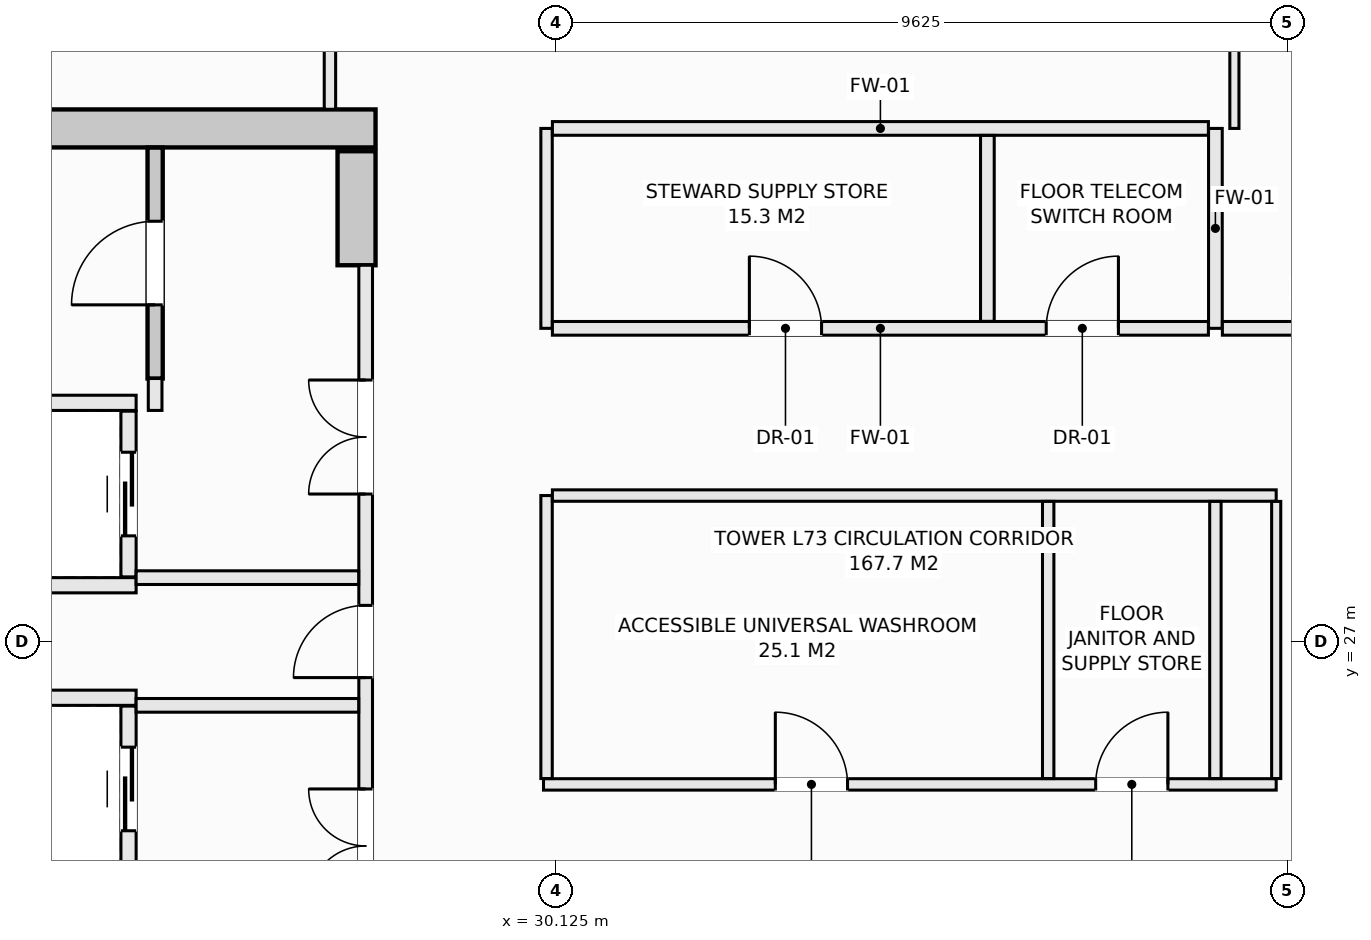
"""IFC4 building model, lengths in metres.
Left out: names, types, materials, properties, quantities, classifications, styles, units other than length and angle.
Written with IfcOpenShell. Run it as: python <this file> out.ifc"""

import sys

from ifc_helpers import new_model, si_unit, direction, frame, frame_2d, origin, place, context, subcontext, project, spatial, rectangle, extrude, element, fill, save


model = new_model("IFC4")
c1 = context("Model", 3, precision=1e-05, world=origin(), true_north=direction((0.0, 1.0)))
c2 = subcontext(c1, "Body", "Model", "MODEL_VIEW")
j1 = project(units=[si_unit("LENGTHUNIT", "METRE"), si_unit("PLANEANGLEUNIT", "RADIAN")], contexts=[c1])
p1 = place(None, origin())
s1 = spatial("IfcSite", under=j1, at=p1, CompositionType="ELEMENT")
p2 = place(p1, origin())
s2 = spatial("IfcBuilding", under=s1, at=p2, CompositionType="ELEMENT")
p3 = place(p2, frame((0.0, 0.0, 269.0)))
s3 = spatial("IfcBuildingStorey", under=s2, at=p3, CompositionType="ELEMENT", Elevation=269.0)
p4 = place(p3, frame((14.25, 33.75, -0.27), z_axis=(0.0, 0.0, 1.0), x_axis=(1.0, 0.0, 0.0)))
e1 = element("IfcWall", 1, at=p4, inside=s3, PredefinedType="SHEAR", context=c2, shape_type="SweptSolid", body=[
    extrude(rectangle(XDim=13.5, YDim=0.5, at=frame_2d((6.75, 0.0))), origin(), (0.0, 0.0, 1.0), 3.3),
])
p5 = place(p3, frame((27.5, 31.95, -0.27), z_axis=(0.0, 0.0, 1.0), x_axis=(0.0, 1.0, 0.0)))
e2 = element("IfcWall", 2, at=p5, inside=s3, PredefinedType="SHEAR", context=c2, shape_type="SweptSolid", body=[
    extrude(rectangle(XDim=1.5, YDim=0.5, at=frame_2d((0.75, 0.0))), origin(), (0.0, 0.0, 1.0), 3.3),
])
p6 = place(p3, frame((24.85, 30.46, -0.27), z_axis=(0.0, 0.0, 1.0), x_axis=(0.0, 1.0, 0.0)))
e3 = element("IfcWall", 3, at=p6, inside=s3, PredefinedType="SHEAR", context=c2, shape_type="SweptSolid", body=[
    extrude(rectangle(XDim=3.038, YDim=0.2, at=frame_2d((1.519, 0.0))), origin(), (0.0, 0.0, 1.0), 3.3),
])
p7 = place(p6, frame((0.969, 0.0, 0.27)))
e4 = element("IfcOpeningElement", 4, at=p7, cuts=e3, PredefinedType="OPENING", context=c2, shape_type="SweptSolid", body=[
    extrude(rectangle(XDim=1.1, YDim=2.15, at=frame_2d((0.55, 1.075))), frame((0.0, 0.11, 0.0), z_axis=(0.0, -1.0, 0.0), x_axis=(1.0, 0.0, 0.0)), (0.0, 0.0, 1.0), 0.22),
])
for number, where, z_axis, x_axis in (
    (5, (22.15, 30.14, 0.0), (0.0, 0.0, 1.0), (1.0, 0.0, 0.0)),
    (6, (22.15, 27.74, 0.0), (0.0, 0.0, 1.0), (1.0, 0.0, 0.0)),
):
    element("IfcWall", number, at=place(p3, frame(where, z_axis=z_axis, x_axis=x_axis)), inside=s3, PredefinedType="SOLIDWALL", context=c2, shape_type="SweptSolid", body=[
        extrude(rectangle(XDim=2.45, YDim=0.2, at=frame_2d((1.225, 0.0))), origin(), (0.0, 0.0, 1.0), 3.03),
    ])
p8 = place(p3, frame((24.5, 27.85, 0.0), z_axis=(0.0, 0.0, 1.0), x_axis=(0.0, 1.0, 0.0)))
e7 = element("IfcWall", 7, at=p8, inside=s3, PredefinedType="SOLIDWALL", context=c2, shape_type="SweptSolid", body=[
    extrude(rectangle(XDim=2.18, YDim=0.2, at=frame_2d((1.09, 0.0))), origin(), (0.0, 0.0, 1.0), 3.03),
])
p9 = place(p8, frame((0.54, 0.0, 0.0)))
e8 = element("IfcOpeningElement", 8, at=p9, cuts=e7, PredefinedType="OPENING", context=c2, shape_type="SweptSolid", body=[
    extrude(rectangle(XDim=1.1, YDim=2.2, at=frame_2d((0.55, 1.1))), frame((0.0, 0.11, 0.0), z_axis=(0.0, -1.0, 0.0), x_axis=(1.0, 0.0, 0.0)), (0.0, 0.0, 1.0), 0.22),
])
p10 = place(p3, frame((22.15, 26.26, 0.0), z_axis=(0.0, 0.0, 1.0), x_axis=(1.0, 0.0, 0.0)))
e9 = element("IfcWall", 9, at=p10, inside=s3, PredefinedType="SOLIDWALL", context=c2, shape_type="SweptSolid", body=[
    extrude(rectangle(XDim=2.45, YDim=0.2, at=frame_2d((1.225, 0.0))), origin(), (0.0, 0.0, 1.0), 3.03),
])
p11 = place(p3, frame((24.5, 23.97, 0.0), z_axis=(0.0, 0.0, 1.0), x_axis=(0.0, 1.0, 0.0)))
e10 = element("IfcWall", 10, at=p11, inside=s3, PredefinedType="SOLIDWALL", context=c2, shape_type="SweptSolid", body=[
    extrude(rectangle(XDim=2.18, YDim=0.2, at=frame_2d((1.09, 0.0))), origin(), (0.0, 0.0, 1.0), 3.03),
])
p12 = place(p11, frame((0.54, 0.0, 0.0)))
e11 = element("IfcOpeningElement", 11, at=p12, cuts=e10, PredefinedType="OPENING", context=c2, shape_type="SweptSolid", body=[
    extrude(rectangle(XDim=1.1, YDim=2.2, at=frame_2d((0.55, 1.1))), frame((0.0, 0.11, 0.0), z_axis=(0.0, -1.0, 0.0), x_axis=(1.0, 0.0, 0.0)), (0.0, 0.0, 1.0), 0.22),
])
p13 = place(p3, frame((24.85, 30.04, 0.0), z_axis=(0.0, 0.0, 1.0), x_axis=(0.0, 1.0, 0.0)))
e12 = element("IfcWall", 12, at=p13, inside=s3, PredefinedType="SOLIDWALL", context=c2, shape_type="SweptSolid", body=[
    extrude(rectangle(XDim=0.42, YDim=0.18, at=frame_2d((0.21, 0.0))), origin(), (0.0, 0.0, 1.0), 3.03),
])
p14 = place(p3, frame((27.62, 22.05, 0.0), z_axis=(0.0, 0.0, 1.0), x_axis=(0.0, 1.0, 0.0)))
e13 = element("IfcWall", 13, at=p14, inside=s3, PredefinedType="SOLIDWALL", context=c2, shape_type="SweptSolid", body=[
    extrude(rectangle(XDim=9.9, YDim=0.18, at=frame_2d((4.95, 0.0))), origin(), (0.0, 0.0, 1.0), 3.03),
])
p15 = place(p14, frame((4.475, 0.0, 0.0)))
e14 = element("IfcOpeningElement", 14, at=p15, cuts=e13, PredefinedType="OPENING", context=c2, shape_type="SweptSolid", body=[
    extrude(rectangle(XDim=0.95, YDim=2.1, at=frame_2d((0.475, 1.05))), frame((0.0, 0.1, 0.0), z_axis=(0.0, -1.0, 0.0), x_axis=(1.0, 0.0, 0.0)), (0.0, 0.0, 1.0), 0.2),
])
p16 = place(p14, frame((6.89, 0.0, 0.0)))
e15 = element("IfcOpeningElement", 15, at=p16, cuts=e13, PredefinedType="OPENING", context=c2, shape_type="SweptSolid", body=[
    extrude(rectangle(XDim=1.5, YDim=2.2, at=frame_2d((0.75, 1.1))), frame((0.0, 0.1, 0.0), z_axis=(0.0, -1.0, 0.0), x_axis=(1.0, 0.0, 0.0)), (0.0, 0.0, 1.0), 0.2),
])
p17 = place(p14, frame((1.51, 0.0, 0.0)))
e16 = element("IfcOpeningElement", 16, at=p17, cuts=e13, PredefinedType="OPENING", context=c2, shape_type="SweptSolid", body=[
    extrude(rectangle(XDim=1.5, YDim=2.2, at=frame_2d((0.75, 1.1))), frame((0.0, 0.1, 0.0), z_axis=(0.0, -1.0, 0.0), x_axis=(1.0, 0.0, 0.0)), (0.0, 0.0, 1.0), 0.2),
])
for number, where, z_axis, x_axis in (
    (17, (24.6, 27.84, 0.0), (0.0, 0.0, 1.0), (1.0, 0.0, 0.0)),
    (18, (24.6, 26.16, 0.0), (0.0, 0.0, 1.0), (1.0, 0.0, 0.0)),
):
    element("IfcWall", number, at=place(p3, frame(where, z_axis=z_axis, x_axis=x_axis)), inside=s3, PredefinedType="SOLIDWALL", context=c2, shape_type="SweptSolid", body=[
        extrude(rectangle(XDim=2.928, YDim=0.18, at=frame_2d((1.464, 0.0))), origin(), (0.0, 0.0, 1.0), 3.03),
    ])
p18 = place(p3, frame((27.15, 34.002, 0.0), z_axis=(0.0, 0.0, 1.0), x_axis=(0.0, 1.0, 0.0)))
e19 = element("IfcWall", 19, at=p18, inside=s3, PredefinedType="PARTITIONING", context=c2, shape_type="SweptSolid", body=[
    extrude(rectangle(XDim=4.198, YDim=0.15, at=frame_2d((2.099, 0.0))), origin(), (0.0, 0.0, 1.0), 3.03),
])
p19 = place(p18, frame((1.998, 0.0, 0.0)))
e20 = element("IfcOpeningElement", 20, at=p19, cuts=e19, PredefinedType="OPENING", context=c2, shape_type="SweptSolid", body=[
    extrude(rectangle(XDim=0.95, YDim=2.1, at=frame_2d((0.475, 1.05))), frame((0.0, 0.085, 0.0), z_axis=(0.0, -1.0, 0.0), x_axis=(1.0, 0.0, 0.0)), (0.0, 0.0, 1.0), 0.17),
])
p20 = place(p3, frame((29.96, 25.12, 0.0), z_axis=(0.0, 0.0, 1.0), x_axis=(1.0, 0.0, 0.0)))
e21 = element("IfcWall", 21, at=p20, inside=s3, PredefinedType="PARTITIONING", context=c2, shape_type="SweptSolid", body=[
    extrude(rectangle(XDim=9.64, YDim=0.15, at=frame_2d((4.82, 0.0))), origin(), (0.0, 0.0, 1.0), 3.03),
])
p21 = place(p20, frame((3.05, 0.0, 0.0)))
e22 = element("IfcOpeningElement", 22, at=p21, cuts=e21, PredefinedType="OPENING", context=c2, shape_type="SweptSolid", body=[
    extrude(rectangle(XDim=0.95, YDim=2.1, at=frame_2d((0.475, 1.05))), frame((0.0, 0.085, 0.0), z_axis=(0.0, -1.0, 0.0), x_axis=(1.0, 0.0, 0.0)), (0.0, 0.0, 1.0), 0.17),
])
p22 = place(p20, frame((7.265, 0.0, 0.0)))
e23 = element("IfcOpeningElement", 23, at=p22, cuts=e21, PredefinedType="OPENING", context=c2, shape_type="SweptSolid", body=[
    extrude(rectangle(XDim=0.95, YDim=2.1, at=frame_2d((0.475, 1.05))), frame((0.0, 0.085, 0.0), z_axis=(0.0, -1.0, 0.0), x_axis=(1.0, 0.0, 0.0)), (0.0, 0.0, 1.0), 0.17),
])
p23 = place(p3, frame((30.0, 25.197, 0.0), z_axis=(0.0, 0.0, 1.0), x_axis=(0.0, 1.0, 0.0)))
e24 = element("IfcWall", 24, at=p23, inside=s3, PredefinedType="PARTITIONING", context=c2, shape_type="SweptSolid", body=[
    extrude(rectangle(XDim=3.723, YDim=0.15, at=frame_2d((1.861, 0.0))), origin(), (0.0, 0.0, 1.0), 3.03),
])
p24 = place(p3, frame((30.0, 31.12, 0.0), z_axis=(0.0, 0.0, 1.0), x_axis=(0.0, 1.0, 0.0)))
e25 = element("IfcWall", 25, at=p24, inside=s3, PredefinedType="PARTITIONING", context=c2, shape_type="SweptSolid", body=[
    extrude(rectangle(XDim=2.63, YDim=0.15, at=frame_2d((1.315, 0.0))), origin(), (0.0, 0.0, 1.0), 3.03),
])
p25 = place(p3, frame((30.077, 28.92, 0.0), z_axis=(0.0, 0.0, 1.0), x_axis=(1.0, 0.0, 0.0)))
e26 = element("IfcWall", 26, at=p25, inside=s3, PredefinedType="PARTITIONING", context=c2, shape_type="SweptSolid", body=[
    extrude(rectangle(XDim=9.523, YDim=0.15, at=frame_2d((4.762, 0.0))), origin(), (0.0, 0.0, 1.0), 3.03),
])
for number, where, z_axis, x_axis in (
    (27, (36.6, 25.197, 0.0), (0.0, 0.0, 1.0), (0.0, 1.0, 0.0)),
    (28, (38.8, 25.197, 0.0), (0.0, 0.0, 1.0), (0.0, 1.0, 0.0)),
):
    element("IfcWall", number, at=place(p3, frame(where, z_axis=z_axis, x_axis=x_axis)), inside=s3, PredefinedType="PARTITIONING", context=c2, shape_type="SweptSolid", body=[
        extrude(rectangle(XDim=3.646, YDim=0.15, at=frame_2d((1.823, 0.0))), origin(), (0.0, 0.0, 1.0), 3.03),
    ])
p26 = place(p3, frame((38.8, 31.12, 0.0), z_axis=(0.0, 0.0, 1.0), x_axis=(0.0, 1.0, 0.0)))
e29 = element("IfcWall", 29, at=p26, inside=s3, PredefinedType="SOLIDWALL", context=c2, shape_type="SweptSolid", body=[
    extrude(rectangle(XDim=2.63, YDim=0.18, at=frame_2d((1.315, 0.0))), origin(), (0.0, 0.0, 1.0), 3.03),
])
p27 = place(p3, frame((30.077, 31.12, 0.0), z_axis=(0.0, 0.0, 1.0), x_axis=(1.0, 0.0, 0.0)))
e30 = element("IfcWall", 30, at=p27, inside=s3, PredefinedType="SOLIDWALL", context=c2, shape_type="SweptSolid", body=[
    extrude(rectangle(XDim=8.631, YDim=0.18, at=frame_2d((4.315, 0.0))), origin(), (0.0, 0.0, 1.0), 3.03),
])
p28 = place(p27, frame((2.592, 0.0, 0.0)))
e31 = element("IfcOpeningElement", 31, at=p28, cuts=e30, PredefinedType="OPENING", context=c2, shape_type="SweptSolid", body=[
    extrude(rectangle(XDim=0.95, YDim=2.1, at=frame_2d((0.475, 1.05))), frame((0.0, 0.1, 0.0), z_axis=(0.0, -1.0, 0.0), x_axis=(1.0, 0.0, 0.0)), (0.0, 0.0, 1.0), 0.2),
])
p29 = place(p27, frame((6.497, 0.0, 0.0)))
e32 = element("IfcOpeningElement", 32, at=p29, cuts=e30, PredefinedType="OPENING", context=c2, shape_type="SweptSolid", body=[
    extrude(rectangle(XDim=0.95, YDim=2.1, at=frame_2d((0.475, 1.05))), frame((0.0, 0.1, 0.0), z_axis=(0.0, -1.0, 0.0), x_axis=(1.0, 0.0, 0.0)), (0.0, 0.0, 1.0), 0.2),
])
p30 = place(p3, frame((38.892, 31.12, 0.0), z_axis=(0.0, 0.0, 1.0), x_axis=(1.0, 0.0, 0.0)))
e33 = element("IfcWall", 33, at=p30, inside=s3, PredefinedType="SOLIDWALL", context=c2, shape_type="SweptSolid", body=[
    extrude(rectangle(XDim=2.628, YDim=0.18, at=frame_2d((1.314, 0.0))), origin(), (0.0, 0.0, 1.0), 3.03),
])
p31 = place(p3, frame((30.077, 33.75, 0.0), z_axis=(0.0, 0.0, 1.0), x_axis=(1.0, 0.0, 0.0)))
e34 = element("IfcWall", 34, at=p31, inside=s3, PredefinedType="SOLIDWALL", context=c2, shape_type="SweptSolid", body=[
    extrude(rectangle(XDim=8.631, YDim=0.18, at=frame_2d((4.315, 0.0))), origin(), (0.0, 0.0, 1.0), 3.03),
])
p32 = place(p3, frame((35.8, 31.212, 0.0), z_axis=(0.0, 0.0, 1.0), x_axis=(0.0, 1.0, 0.0)))
e35 = element("IfcWall", 35, at=p32, inside=s3, PredefinedType="SOLIDWALL", context=c2, shape_type="SweptSolid", body=[
    extrude(rectangle(XDim=2.446, YDim=0.18, at=frame_2d((1.223, 0.0))), origin(), (0.0, 0.0, 1.0), 3.03),
])
p33 = place(p3, frame((39.05, 33.75, 0.0), z_axis=(0.0, 0.0, 1.0), x_axis=(0.0, 1.0, 0.0)))
e36 = element("IfcWall", 36, at=p33, inside=s3, PredefinedType="PARTITIONING", context=c2, shape_type="SweptSolid", body=[
    extrude(rectangle(XDim=1.938, YDim=0.12, at=frame_2d((0.969, 0.0))), origin(), (0.0, 0.0, 1.0), 3.03),
])
p34 = place(p3, frame((39.6, 25.197, 0.0), z_axis=(0.0, 0.0, 1.0), x_axis=(0.0, 1.0, 0.0)))
e37 = element("IfcWall", 37, at=p34, inside=s3, PredefinedType="PARTITIONING", context=c2, shape_type="SweptSolid", body=[
    extrude(rectangle(XDim=3.646, YDim=0.12, at=frame_2d((1.823, 0.0))), origin(), (0.0, 0.0, 1.0), 3.03),
])
p35 = place(p7, origin())
e38 = element("IfcDoor", 38, at=p35, inside=s3, OperationType="SINGLE_SWING_LEFT", PredefinedType="DOOR", context=c2, shape_type="SweptSolid", body=[
    extrude(rectangle(XDim=1.1, YDim=2.15, at=frame_2d((0.55, 1.075))), frame((0.0, 0.025, 0.0), z_axis=(0.0, -1.0, 0.0), x_axis=(1.0, 0.0, 0.0)), (0.0, 0.0, 1.0), 0.05),
])
fill(e4, e38)
p36 = place(p9, origin())
e39 = element("IfcDoor", 39, at=p36, inside=s3, OperationType="SLIDING_TO_LEFT", PredefinedType="DOOR", context=c2, shape_type="SweptSolid", body=[
    extrude(rectangle(XDim=1.1, YDim=2.2, at=frame_2d((0.55, 1.1))), frame((0.0, 0.025, 0.0), z_axis=(0.0, -1.0, 0.0), x_axis=(1.0, 0.0, 0.0)), (0.0, 0.0, 1.0), 0.05),
])
fill(e8, e39)
p37 = place(p12, origin())
e40 = element("IfcDoor", 40, at=p37, inside=s3, OperationType="SLIDING_TO_LEFT", PredefinedType="DOOR", context=c2, shape_type="SweptSolid", body=[
    extrude(rectangle(XDim=1.1, YDim=2.2, at=frame_2d((0.55, 1.1))), frame((0.0, 0.025, 0.0), z_axis=(0.0, -1.0, 0.0), x_axis=(1.0, 0.0, 0.0)), (0.0, 0.0, 1.0), 0.05),
])
fill(e11, e40)
p38 = place(p15, origin())
e41 = element("IfcDoor", 41, at=p38, inside=s3, OperationType="SINGLE_SWING_LEFT", PredefinedType="DOOR", context=c2, shape_type="SweptSolid", body=[
    extrude(rectangle(XDim=0.95, YDim=2.1, at=frame_2d((0.475, 1.05))), frame((0.0, 0.025, 0.0), z_axis=(0.0, -1.0, 0.0), x_axis=(1.0, 0.0, 0.0)), (0.0, 0.0, 1.0), 0.05),
])
fill(e14, e41)
p39 = place(p16, origin())
e42 = element("IfcDoor", 42, at=p39, inside=s3, OperationType="DOUBLE_DOOR_SINGLE_SWING", PredefinedType="DOOR", context=c2, shape_type="SweptSolid", body=[
    extrude(rectangle(XDim=1.5, YDim=2.2, at=frame_2d((0.75, 1.1))), frame((0.0, 0.025, 0.0), z_axis=(0.0, -1.0, 0.0), x_axis=(1.0, 0.0, 0.0)), (0.0, 0.0, 1.0), 0.05),
])
fill(e15, e42)
p40 = place(p17, origin())
e43 = element("IfcDoor", 43, at=p40, inside=s3, OperationType="DOUBLE_DOOR_SINGLE_SWING", PredefinedType="DOOR", context=c2, shape_type="SweptSolid", body=[
    extrude(rectangle(XDim=1.5, YDim=2.2, at=frame_2d((0.75, 1.1))), frame((0.0, 0.025, 0.0), z_axis=(0.0, -1.0, 0.0), x_axis=(1.0, 0.0, 0.0)), (0.0, 0.0, 1.0), 0.05),
])
fill(e16, e43)
p41 = place(p21, origin())
e44 = element("IfcDoor", 44, at=p41, inside=s3, OperationType="SINGLE_SWING_LEFT", PredefinedType="DOOR", context=c2, shape_type="SweptSolid", body=[
    extrude(rectangle(XDim=0.95, YDim=2.1, at=frame_2d((0.475, 1.05))), frame((0.0, 0.025, 0.0), z_axis=(0.0, -1.0, 0.0), x_axis=(1.0, 0.0, 0.0)), (0.0, 0.0, 1.0), 0.05),
])
fill(e22, e44)
p42 = place(p22, origin())
e45 = element("IfcDoor", 45, at=p42, inside=s3, OperationType="SINGLE_SWING_RIGHT", PredefinedType="DOOR", context=c2, shape_type="SweptSolid", body=[
    extrude(rectangle(XDim=0.95, YDim=2.1, at=frame_2d((0.475, 1.05))), frame((0.0, 0.025, 0.0), z_axis=(0.0, -1.0, 0.0), x_axis=(1.0, 0.0, 0.0)), (0.0, 0.0, 1.0), 0.05),
])
fill(e23, e45)
p43 = place(p28, origin())
e46 = element("IfcDoor", 46, at=p43, inside=s3, OperationType="SINGLE_SWING_LEFT", PredefinedType="DOOR", context=c2, shape_type="SweptSolid", body=[
    extrude(rectangle(XDim=0.95, YDim=2.1, at=frame_2d((0.475, 1.05))), frame((0.0, 0.025, 0.0), z_axis=(0.0, -1.0, 0.0), x_axis=(1.0, 0.0, 0.0)), (0.0, 0.0, 1.0), 0.05),
])
fill(e31, e46)
p44 = place(p29, origin())
e47 = element("IfcDoor", 47, at=p44, inside=s3, OperationType="SINGLE_SWING_RIGHT", PredefinedType="DOOR", context=c2, shape_type="SweptSolid", body=[
    extrude(rectangle(XDim=0.95, YDim=2.1, at=frame_2d((0.475, 1.05))), frame((0.0, 0.025, 0.0), z_axis=(0.0, -1.0, 0.0), x_axis=(1.0, 0.0, 0.0)), (0.0, 0.0, 1.0), 0.05),
])
fill(e32, e47)
save(model, sys.argv[1])
